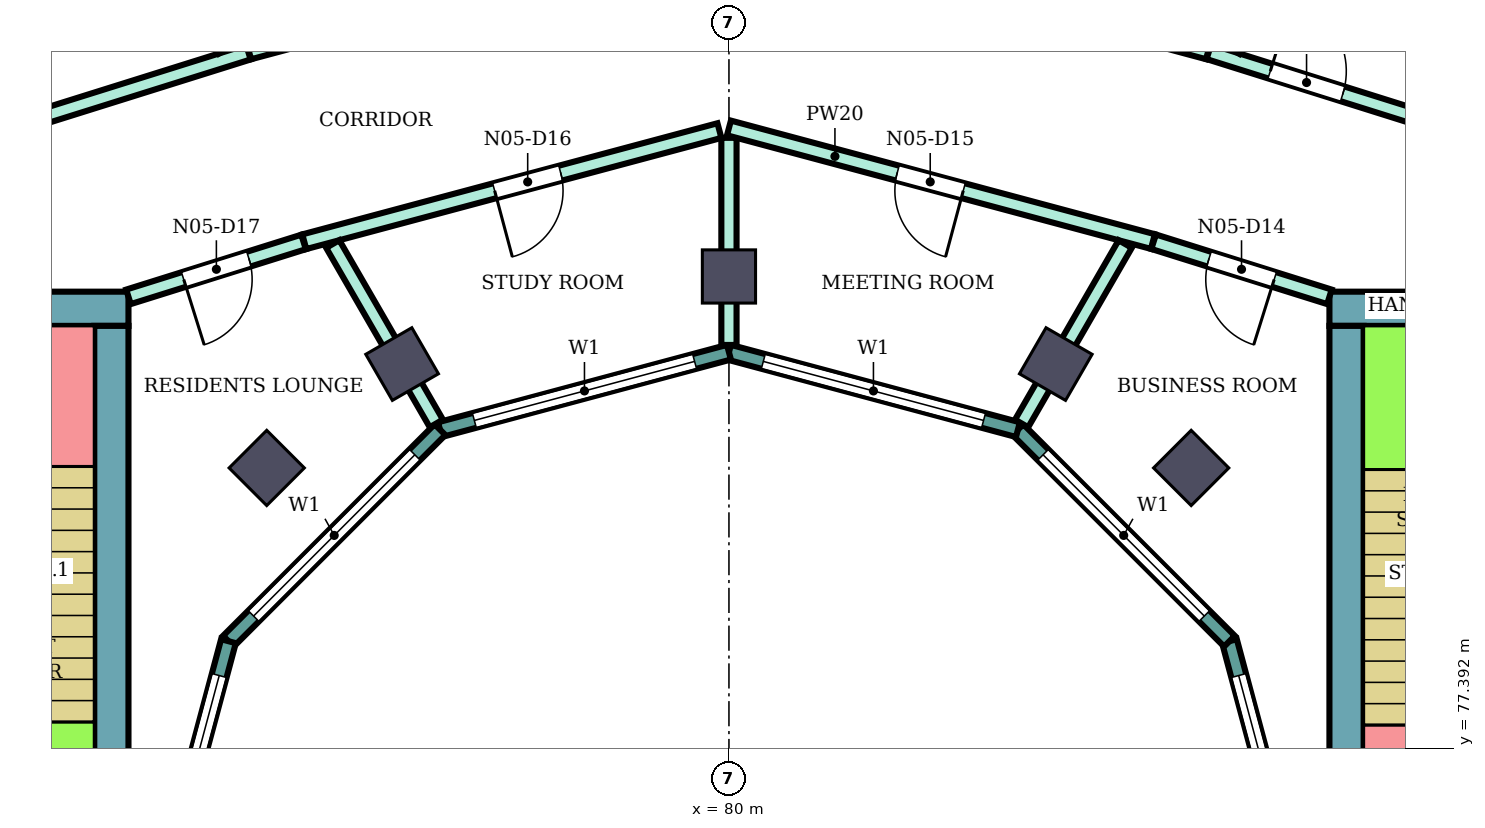
"""IFC4 building model, lengths in metres.
Left out: names, types, materials, properties, quantities, classifications, styles, units other than length and angle.
Written with IfcOpenShell. Run it as: python <this file> out.ifc"""

import sys

from ifc_helpers import new_model, si_unit, direction, frame, frame_2d, origin, origin_2d, place, context, subcontext, project, spatial, rectangle, extrude, element, fill, save


model = new_model("IFC4")
c1 = context("Model", 3, precision=1e-05, world=origin(), true_north=direction((0.0, 1.0)))
c2 = subcontext(c1, "Body", "Model", "MODEL_VIEW")
j1 = project(units=[si_unit("LENGTHUNIT", "METRE"), si_unit("PLANEANGLEUNIT", "RADIAN")], contexts=[c1])
p1 = place(None, origin())
s1 = spatial("IfcSite", under=j1, at=p1, CompositionType="ELEMENT")
p2 = place(p1, origin())
s2 = spatial("IfcBuilding", under=s1, at=p2, CompositionType="ELEMENT")
p3 = place(p2, frame((0.0, 0.0, 314.9)))
s3 = spatial("IfcBuildingStorey", under=s2, at=p3, CompositionType="ELEMENT", Elevation=314.9)
for number, where, z_axis, x_axis in (
    (1, (86.081, 81.081, 0.0), (0.0, 0.0, 1.0), (0.707, 0.707, 0.0)),
    (2, (84.3, 82.448, 0.0), (0.0, 0.0, 1.0), (0.5, 0.866, 0.0)),
    (3, (80.0, 83.6, 0.0), (0.0, 0.0, 1.0), (0.0, 1.0, 0.0)),
    (4, (75.7, 82.448, 0.0), (0.0, 0.0, 1.0), (-0.5, 0.866, 0.0)),
    (5, (73.919, 81.081, 0.0), (0.0, 0.0, 1.0), (-0.707, 0.707, 0.0)),
):
    element("IfcColumn", number, at=place(p3, frame(where, z_axis=z_axis, x_axis=x_axis)), inside=s3, PredefinedType="COLUMN", context=c2, shape_type="SweptSolid", body=[
        extrude(rectangle(XDim=0.7, YDim=0.7, at=origin_2d()), origin(), (0.0, 0.0, 1.0), 4.4),
    ])
p4 = place(p3, frame((87.9, 83.175, 0.0), z_axis=(0.0, 0.0, 1.0), x_axis=(1.0, 0.0, 0.0)))
e6 = element("IfcWall", 6, at=p4, inside=s3, PredefinedType="SHEAR", context=c2, shape_type="SweptSolid", body=[
    extrude(rectangle(XDim=10.0, YDim=0.45, at=frame_2d((5.0, 0.0))), origin(), (0.0, 0.0, 1.0), 4.08),
])
p5 = place(p4, frame((4.2, 0.0, 0.0)))
e7 = element("IfcOpeningElement", 7, at=p5, cuts=e6, PredefinedType="OPENING", context=c2, shape_type="SweptSolid", body=[
    extrude(rectangle(XDim=2.4, YDim=2.4, at=frame_2d((1.2, 1.2))), frame((0.0, 0.235, 0.0), z_axis=(0.0, -1.0, 0.0), x_axis=(1.0, 0.0, 0.0)), (0.0, 0.0, 1.0), 0.47),
])
p6 = place(p3, frame((88.125, 75.0, 0.0), z_axis=(0.0, 0.0, 1.0), x_axis=(0.0, 1.0, 0.0)))
e8 = element("IfcWall", 8, at=p6, inside=s3, PredefinedType="SHEAR", context=c2, shape_type="SweptSolid", body=[
    extrude(rectangle(XDim=7.95, YDim=0.45, at=frame_2d((3.975, 0.0))), origin(), (0.0, 0.0, 1.0), 4.08),
])
p7 = place(p3, frame((72.1, 83.175, 0.0), z_axis=(0.0, 0.0, 1.0), x_axis=(-1.0, 0.0, 0.0)))
e9 = element("IfcWall", 9, at=p7, inside=s3, PredefinedType="SHEAR", context=c2, shape_type="SweptSolid", body=[
    extrude(rectangle(XDim=10.0, YDim=0.45, at=frame_2d((5.0, 0.0))), origin(), (0.0, 0.0, 1.0), 4.08),
])
p8 = place(p7, frame((4.2, 0.0, 0.0)))
e10 = element("IfcOpeningElement", 10, at=p8, cuts=e9, PredefinedType="OPENING", context=c2, shape_type="SweptSolid", body=[
    extrude(rectangle(XDim=2.4, YDim=2.4, at=frame_2d((1.2, 1.2))), frame((0.0, 0.235, 0.0), z_axis=(0.0, -1.0, 0.0), x_axis=(1.0, 0.0, 0.0)), (0.0, 0.0, 1.0), 0.47),
])
p9 = place(p3, frame((71.875, 82.95, 0.0), z_axis=(0.0, 0.0, 1.0), x_axis=(0.0, -1.0, 0.0)))
e11 = element("IfcWall", 11, at=p9, inside=s3, PredefinedType="SHEAR", context=c2, shape_type="SweptSolid", body=[
    extrude(rectangle(XDim=7.95, YDim=0.45, at=frame_2d((3.975, 0.0))), origin(), (0.0, 0.0, 1.0), 4.08),
])
p10 = place(p3, frame((87.604, 75.0, 0.0), z_axis=(0.0, 0.0, 1.0), x_axis=(-0.258789828301, 0.965933654434, 0.0)))
e12 = element("IfcWall", 12, at=p10, inside=s3, PredefinedType="NOTDEFINED", context=c2, shape_type="SweptSolid", body=[
    extrude(rectangle(XDim=3.936, YDim=0.2, at=frame_2d((1.968, 0.0))), origin(), (0.0, 0.0, 1.0), 4.4),
])
p11 = place(p10, frame((0.468, 0.0, 0.9)))
e13 = element("IfcOpeningElement", 13, at=p11, cuts=e12, PredefinedType="OPENING", context=c2, shape_type="SweptSolid", body=[
    extrude(rectangle(XDim=3.0, YDim=2.3, at=frame_2d((1.5, 1.15))), frame((0.0, 0.11, 0.0), z_axis=(0.0, -1.0, 0.0), x_axis=(1.0, 0.0, 0.0)), (0.0, 0.0, 1.0), 0.22),
])
p12 = place(p3, frame((86.585, 78.802, 0.0), z_axis=(0.0, 0.0, 1.0), x_axis=(-0.707106781187, 0.707106781187, 0.0)))
e14 = element("IfcWall", 14, at=p12, inside=s3, PredefinedType="NOTDEFINED", context=c2, shape_type="SweptSolid", body=[
    extrude(rectangle(XDim=3.936, YDim=0.2, at=frame_2d((1.968, 0.0))), origin(), (0.0, 0.0, 1.0), 4.4),
])
p13 = place(p12, frame((0.468, 0.0, 0.9)))
e15 = element("IfcOpeningElement", 15, at=p13, cuts=e14, PredefinedType="OPENING", context=c2, shape_type="SweptSolid", body=[
    extrude(rectangle(XDim=3.0, YDim=2.3, at=frame_2d((1.5, 1.15))), frame((0.0, 0.11, 0.0), z_axis=(0.0, -1.0, 0.0), x_axis=(1.0, 0.0, 0.0)), (0.0, 0.0, 1.0), 0.22),
])
p14 = place(p3, frame((83.802, 81.585, 0.0), z_axis=(0.0, 0.0, 1.0), x_axis=(-0.965933654434, 0.258789828301, 0.0)))
e16 = element("IfcWall", 16, at=p14, inside=s3, PredefinedType="NOTDEFINED", context=c2, shape_type="SweptSolid", body=[
    extrude(rectangle(XDim=3.936, YDim=0.2, at=frame_2d((1.968, 0.0))), origin(), (0.0, 0.0, 1.0), 4.4),
])
p15 = place(p14, frame((0.468, 0.0, 0.9)))
e17 = element("IfcOpeningElement", 17, at=p15, cuts=e16, PredefinedType="OPENING", context=c2, shape_type="SweptSolid", body=[
    extrude(rectangle(XDim=3.0, YDim=2.3, at=frame_2d((1.5, 1.15))), frame((0.0, 0.11, 0.0), z_axis=(0.0, -1.0, 0.0), x_axis=(1.0, 0.0, 0.0)), (0.0, 0.0, 1.0), 0.22),
])
p16 = place(p3, frame((80.0, 82.604, 0.0), z_axis=(0.0, 0.0, 1.0), x_axis=(-0.965933654434, -0.258789828301, 0.0)))
e18 = element("IfcWall", 18, at=p16, inside=s3, PredefinedType="NOTDEFINED", context=c2, shape_type="SweptSolid", body=[
    extrude(rectangle(XDim=3.936, YDim=0.2, at=frame_2d((1.968, 0.0))), origin(), (0.0, 0.0, 1.0), 4.4),
])
p17 = place(p16, frame((0.468, 0.0, 0.9)))
e19 = element("IfcOpeningElement", 19, at=p17, cuts=e18, PredefinedType="OPENING", context=c2, shape_type="SweptSolid", body=[
    extrude(rectangle(XDim=3.0, YDim=2.3, at=frame_2d((1.5, 1.15))), frame((0.0, 0.11, 0.0), z_axis=(0.0, -1.0, 0.0), x_axis=(1.0, 0.0, 0.0)), (0.0, 0.0, 1.0), 0.22),
])
p18 = place(p3, frame((76.198, 81.585, 0.0), z_axis=(0.0, 0.0, 1.0), x_axis=(-0.707106781187, -0.707106781187, 0.0)))
e20 = element("IfcWall", 20, at=p18, inside=s3, PredefinedType="NOTDEFINED", context=c2, shape_type="SweptSolid", body=[
    extrude(rectangle(XDim=3.936, YDim=0.2, at=frame_2d((1.968, 0.0))), origin(), (0.0, 0.0, 1.0), 4.4),
])
p19 = place(p18, frame((0.468, 0.0, 0.9)))
e21 = element("IfcOpeningElement", 21, at=p19, cuts=e20, PredefinedType="OPENING", context=c2, shape_type="SweptSolid", body=[
    extrude(rectangle(XDim=3.0, YDim=2.3, at=frame_2d((1.5, 1.15))), frame((0.0, 0.11, 0.0), z_axis=(0.0, -1.0, 0.0), x_axis=(1.0, 0.0, 0.0)), (0.0, 0.0, 1.0), 0.22),
])
p20 = place(p3, frame((73.415, 78.802, 0.0), z_axis=(0.0, 0.0, 1.0), x_axis=(-0.258789828301, -0.965933654434, 0.0)))
e22 = element("IfcWall", 22, at=p20, inside=s3, PredefinedType="NOTDEFINED", context=c2, shape_type="SweptSolid", body=[
    extrude(rectangle(XDim=3.936, YDim=0.2, at=frame_2d((1.968, 0.0))), origin(), (0.0, 0.0, 1.0), 4.4),
])
p21 = place(p20, frame((0.468, 0.0, 0.9)))
e23 = element("IfcOpeningElement", 23, at=p21, cuts=e22, PredefinedType="OPENING", context=c2, shape_type="SweptSolid", body=[
    extrude(rectangle(XDim=3.0, YDim=2.3, at=frame_2d((1.5, 1.15))), frame((0.0, 0.11, 0.0), z_axis=(0.0, -1.0, 0.0), x_axis=(1.0, 0.0, 0.0)), (0.0, 0.0, 1.0), 0.22),
])
p22 = place(p3, frame((68.201, 84.834, 0.0), z_axis=(0.0, 0.0, 1.0), x_axis=(0.954232917497, 0.29906443982, 0.0)))
e24 = element("IfcWall", 24, at=p22, inside=s3, PredefinedType="PARTITIONING", context=c2, shape_type="SweptSolid", body=[
    extrude(rectangle(XDim=5.74, YDim=0.2, at=frame_2d((2.87, 0.0))), origin(), (0.0, 0.0, 1.0), 3.95),
])
p23 = place(p3, frame((72.1, 83.332, 0.0), z_axis=(0.0, 0.0, 1.0), x_axis=(0.954233106619, 0.299063836383, 0.0)))
e25 = element("IfcWall", 25, at=p23, inside=s3, PredefinedType="PARTITIONING", context=c2, shape_type="SweptSolid", body=[
    extrude(rectangle(XDim=2.414, YDim=0.2, at=frame_2d((1.207, 0.0))), origin(), (0.0, 0.0, 1.0), 3.95),
])
p24 = place(p23, frame((0.762, 0.0, 0.0)))
e26 = element("IfcOpeningElement", 26, at=p24, cuts=e25, PredefinedType="OPENING", context=c2, shape_type="SweptSolid", body=[
    extrude(rectangle(XDim=0.9, YDim=2.1, at=frame_2d((0.45, 1.05))), frame((0.0, 0.11, 0.0), z_axis=(0.0, -1.0, 0.0), x_axis=(1.0, 0.0, 0.0)), (0.0, 0.0, 1.0), 0.22),
])
p25 = place(p3, frame((73.687, 86.554, 0.0), z_axis=(0.0, 0.0, 1.0), x_axis=(0.96595903825, 0.258695064551, 0.0)))
e27 = element("IfcWall", 27, at=p25, inside=s3, PredefinedType="PARTITIONING", context=c2, shape_type="SweptSolid", body=[
    extrude(rectangle(XDim=6.446, YDim=0.2, at=frame_2d((3.223, 0.0))), origin(), (0.0, 0.0, 1.0), 3.95),
])
p26 = place(p25, frame((3.638, 0.0, 0.0)))
e28 = element("IfcOpeningElement", 28, at=p26, cuts=e27, PredefinedType="OPENING", context=c2, shape_type="SweptSolid", body=[
    extrude(rectangle(XDim=1.0, YDim=2.1, at=frame_2d((0.5, 1.05))), frame((0.0, 0.11, 0.0), z_axis=(0.0, -1.0, 0.0), x_axis=(1.0, 0.0, 0.0)), (0.0, 0.0, 1.0), 0.22),
])
p27 = place(p3, frame((74.413, 84.057, 0.0), z_axis=(0.0, 0.0, 1.0), x_axis=(0.965972135939, 0.258646153246, 0.0)))
e29 = element("IfcWall", 29, at=p27, inside=s3, PredefinedType="PARTITIONING", context=c2, shape_type="SweptSolid", body=[
    extrude(rectangle(XDim=5.654, YDim=0.2, at=frame_2d((2.827, 0.0))), origin(), (0.0, 0.0, 1.0), 3.95),
])
p28 = place(p27, frame((2.593, 0.0, 0.0)))
e30 = element("IfcOpeningElement", 30, at=p28, cuts=e29, PredefinedType="OPENING", context=c2, shape_type="SweptSolid", body=[
    extrude(rectangle(XDim=0.9, YDim=2.1, at=frame_2d((0.45, 1.05))), frame((0.0, 0.11, 0.0), z_axis=(0.0, -1.0, 0.0), x_axis=(1.0, 0.0, 0.0)), (0.0, 0.0, 1.0), 0.22),
])
p29 = place(p3, frame((74.787, 84.027, 0.0), z_axis=(0.0, 0.0, 1.0), x_axis=(0.500079107518, -0.86597972622, 0.0)))
e31 = element("IfcWall", 31, at=p29, inside=s3, PredefinedType="PARTITIONING", context=c2, shape_type="SweptSolid", body=[
    extrude(rectangle(XDim=2.726, YDim=0.2, at=frame_2d((1.363, 0.0))), origin(), (0.0, 0.0, 1.0), 3.95),
])
p30 = place(p3, frame((80.0, 82.699, 0.0), z_axis=(0.0, 0.0, 1.0), x_axis=(0.0, 1.0, 0.0)))
e32 = element("IfcWall", 32, at=p30, inside=s3, PredefinedType="PARTITIONING", context=c2, shape_type="SweptSolid", body=[
    extrude(rectangle(XDim=2.725, YDim=0.2, at=frame_2d((1.363, 0.0))), origin(), (0.0, 0.0, 1.0), 3.95),
])
p31 = place(p3, frame((80.0, 85.554, 0.0), z_axis=(0.0, 0.0, 1.0), x_axis=(0.965928989968, -0.258807237802, 0.0)))
e33 = element("IfcWall", 33, at=p31, inside=s3, PredefinedType="PARTITIONING", context=c2, shape_type="SweptSolid", body=[
    extrude(rectangle(XDim=5.774, YDim=0.2, at=frame_2d((2.887, 0.0))), origin(), (0.0, 0.0, 1.0), 3.95),
])
p32 = place(p31, frame((2.292, 0.0, 0.0)))
e34 = element("IfcOpeningElement", 34, at=p32, cuts=e33, PredefinedType="OPENING", context=c2, shape_type="SweptSolid", body=[
    extrude(rectangle(XDim=0.9, YDim=2.1, at=frame_2d((0.45, 1.05))), frame((0.0, 0.11, 0.0), z_axis=(0.0, -1.0, 0.0), x_axis=(1.0, 0.0, 0.0)), (0.0, 0.0, 1.0), 0.22),
])
p33 = place(p3, frame((80.0, 88.247, 0.0), z_axis=(0.0, 0.0, 1.0), x_axis=(0.965807659316, -0.259259648244, 0.0)))
e35 = element("IfcWall", 35, at=p33, inside=s3, PredefinedType="PARTITIONING", context=c2, shape_type="SweptSolid", body=[
    extrude(rectangle(XDim=6.526, YDim=0.2, at=frame_2d((3.263, 0.0))), origin(), (0.0, 0.0, 1.0), 3.95),
])
p34 = place(p33, frame((1.93, 0.0, 0.0)))
e36 = element("IfcOpeningElement", 36, at=p34, cuts=e35, PredefinedType="OPENING", context=c2, shape_type="SweptSolid", body=[
    extrude(rectangle(XDim=1.0, YDim=2.1, at=frame_2d((0.5, 1.05))), frame((0.0, 0.11, 0.0), z_axis=(0.0, -1.0, 0.0), x_axis=(1.0, 0.0, 0.0)), (0.0, 0.0, 1.0), 0.22),
])
p35 = place(p3, frame((83.85, 81.667, 0.0), z_axis=(0.0, 0.0, 1.0), x_axis=(0.500185068774, 0.865918527909, 0.0)))
e37 = element("IfcWall", 37, at=p35, inside=s3, PredefinedType="PARTITIONING", context=c2, shape_type="SweptSolid", body=[
    extrude(rectangle(XDim=2.726, YDim=0.2, at=frame_2d((1.363, 0.0))), origin(), (0.0, 0.0, 1.0), 3.95),
])
p36 = place(p3, frame((85.587, 84.057, 0.0), z_axis=(0.0, 0.0, 1.0), x_axis=(0.954239513179, -0.299043393987, 0.0)))
e38 = element("IfcWall", 38, at=p36, inside=s3, PredefinedType="PARTITIONING", context=c2, shape_type="SweptSolid", body=[
    extrude(rectangle(XDim=2.424, YDim=0.2, at=frame_2d((1.212, 0.0))), origin(), (0.0, 0.0, 1.0), 3.95),
])
p37 = place(p36, frame((0.762, 0.0, 0.0)))
e39 = element("IfcOpeningElement", 39, at=p37, cuts=e38, PredefinedType="OPENING", context=c2, shape_type="SweptSolid", body=[
    extrude(rectangle(XDim=0.9, YDim=2.1, at=frame_2d((0.45, 1.05))), frame((0.0, 0.11, 0.0), z_axis=(0.0, -1.0, 0.0), x_axis=(1.0, 0.0, 0.0)), (0.0, 0.0, 1.0), 0.22),
])
p38 = place(p3, frame((86.313, 86.555, 0.0), z_axis=(0.0, 0.0, 1.0), x_axis=(0.9540216201, -0.299737799389, 0.0)))
e40 = element("IfcWall", 40, at=p38, inside=s3, PredefinedType="PARTITIONING", context=c2, shape_type="SweptSolid", body=[
    extrude(rectangle(XDim=5.719, YDim=0.2, at=frame_2d((2.86, 0.0))), origin(), (0.0, 0.0, 1.0), 3.95),
])
p39 = place(p38, frame((0.848, 0.0, 0.0)))
e41 = element("IfcOpeningElement", 41, at=p39, cuts=e40, PredefinedType="OPENING", context=c2, shape_type="SweptSolid", body=[
    extrude(rectangle(XDim=1.0, YDim=2.1, at=frame_2d((0.5, 1.05))), frame((0.0, 0.11, 0.0), z_axis=(0.0, -1.0, 0.0), x_axis=(1.0, 0.0, 0.0)), (0.0, 0.0, 1.0), 0.22),
])
p40 = place(p3, frame((69.855, 92.579, 0.0), z_axis=(0.0, 0.0, 1.0), x_axis=(0.499801463163, -0.866139998742, 0.0)))
e42 = element("IfcWall", 42, at=p40, inside=s3, PredefinedType="PARTITIONING", context=c2, shape_type="SweptSolid", body=[
    extrude(rectangle(XDim=6.955, YDim=0.1, at=frame_2d((3.478, 0.0))), origin(), (0.0, 0.0, 1.0), 3.95),
])
p41 = place(p40, frame((1.029, 0.0, 0.0)))
e43 = element("IfcOpeningElement", 43, at=p41, cuts=e42, PredefinedType="OPENING", context=c2, shape_type="SweptSolid", body=[
    extrude(rectangle(XDim=0.9, YDim=2.1, at=frame_2d((0.45, 1.05))), frame((0.0, 0.06, 0.0), z_axis=(0.0, -1.0, 0.0), x_axis=(1.0, 0.0, 0.0)), (0.0, 0.0, 1.0), 0.12),
])
p42 = place(p3, frame((86.673, 86.553, 0.0), z_axis=(0.0, 0.0, 1.0), x_axis=(0.500103298341, 0.865965756245, 0.0)))
e44 = element("IfcWall", 44, at=p42, inside=s3, PredefinedType="PARTITIONING", context=c2, shape_type="SweptSolid", body=[
    extrude(rectangle(XDim=6.955, YDim=0.1, at=frame_2d((3.477, 0.0))), origin(), (0.0, 0.0, 1.0), 3.95),
])
p43 = place(p42, frame((5.015, 0.0, 0.0)))
e45 = element("IfcOpeningElement", 45, at=p43, cuts=e44, PredefinedType="OPENING", context=c2, shape_type="SweptSolid", body=[
    extrude(rectangle(XDim=0.9, YDim=2.1, at=frame_2d((0.45, 1.05))), frame((0.0, 0.06, 0.0), z_axis=(0.0, -1.0, 0.0), x_axis=(1.0, 0.0, 0.0)), (0.0, 0.0, 1.0), 0.12),
])
p44 = place(p42, frame((1.028, 0.0, 0.0)))
e46 = element("IfcOpeningElement", 46, at=p44, cuts=e44, PredefinedType="OPENING", context=c2, shape_type="SweptSolid", body=[
    extrude(rectangle(XDim=0.8, YDim=2.1, at=frame_2d((0.4, 1.05))), frame((0.0, 0.06, 0.0), z_axis=(0.0, -1.0, 0.0), x_axis=(1.0, 0.0, 0.0)), (0.0, 0.0, 1.0), 0.12),
])
p45 = place(p11, origin())
e47 = element("IfcWindow", 47, at=p45, inside=s3, PartitioningType="SINGLE_PANEL", PredefinedType="WINDOW", context=c2, shape_type="SweptSolid", body=[
    extrude(rectangle(XDim=3.0, YDim=2.3, at=frame_2d((1.5, 1.15))), frame((0.0, 0.03, 0.0), z_axis=(0.0, -1.0, 0.0), x_axis=(1.0, 0.0, 0.0)), (0.0, 0.0, 1.0), 0.06),
])
fill(e13, e47)
p46 = place(p13, origin())
e48 = element("IfcWindow", 48, at=p46, inside=s3, PartitioningType="SINGLE_PANEL", PredefinedType="WINDOW", context=c2, shape_type="SweptSolid", body=[
    extrude(rectangle(XDim=3.0, YDim=2.3, at=frame_2d((1.5, 1.15))), frame((0.0, 0.03, 0.0), z_axis=(0.0, -1.0, 0.0), x_axis=(1.0, 0.0, 0.0)), (0.0, 0.0, 1.0), 0.06),
])
fill(e15, e48)
p47 = place(p15, origin())
e49 = element("IfcWindow", 49, at=p47, inside=s3, PartitioningType="SINGLE_PANEL", PredefinedType="WINDOW", context=c2, shape_type="SweptSolid", body=[
    extrude(rectangle(XDim=3.0, YDim=2.3, at=frame_2d((1.5, 1.15))), frame((0.0, 0.03, 0.0), z_axis=(0.0, -1.0, 0.0), x_axis=(1.0, 0.0, 0.0)), (0.0, 0.0, 1.0), 0.06),
])
fill(e17, e49)
p48 = place(p17, origin())
e50 = element("IfcWindow", 50, at=p48, inside=s3, PartitioningType="SINGLE_PANEL", PredefinedType="WINDOW", context=c2, shape_type="SweptSolid", body=[
    extrude(rectangle(XDim=3.0, YDim=2.3, at=frame_2d((1.5, 1.15))), frame((0.0, 0.03, 0.0), z_axis=(0.0, -1.0, 0.0), x_axis=(1.0, 0.0, 0.0)), (0.0, 0.0, 1.0), 0.06),
])
fill(e19, e50)
p49 = place(p19, origin())
e51 = element("IfcWindow", 51, at=p49, inside=s3, PartitioningType="SINGLE_PANEL", PredefinedType="WINDOW", context=c2, shape_type="SweptSolid", body=[
    extrude(rectangle(XDim=3.0, YDim=2.3, at=frame_2d((1.5, 1.15))), frame((0.0, 0.03, 0.0), z_axis=(0.0, -1.0, 0.0), x_axis=(1.0, 0.0, 0.0)), (0.0, 0.0, 1.0), 0.06),
])
fill(e21, e51)
p50 = place(p21, origin())
e52 = element("IfcWindow", 52, at=p50, inside=s3, PartitioningType="SINGLE_PANEL", PredefinedType="WINDOW", context=c2, shape_type="SweptSolid", body=[
    extrude(rectangle(XDim=3.0, YDim=2.3, at=frame_2d((1.5, 1.15))), frame((0.0, 0.03, 0.0), z_axis=(0.0, -1.0, 0.0), x_axis=(1.0, 0.0, 0.0)), (0.0, 0.0, 1.0), 0.06),
])
fill(e23, e52)
p51 = place(p39, origin())
e53 = element("IfcDoor", 53, at=p51, inside=s3, OperationType="SINGLE_SWING_LEFT", PredefinedType="DOOR", context=c2, shape_type="SweptSolid", body=[
    extrude(rectangle(XDim=1.0, YDim=2.1, at=frame_2d((0.5, 1.05))), frame((0.0, 0.025, 0.0), z_axis=(0.0, -1.0, 0.0), x_axis=(1.0, 0.0, 0.0)), (0.0, 0.0, 1.0), 0.05),
])
fill(e41, e53)
p52 = place(p37, frame((0.9, 0.0, 0.0), z_axis=(0.0, 0.0, 1.0), x_axis=(-1.0, 0.0, 0.0)))
e54 = element("IfcDoor", 54, at=p52, inside=s3, OperationType="SINGLE_SWING_LEFT", PredefinedType="DOOR", context=c2, shape_type="SweptSolid", body=[
    extrude(rectangle(XDim=0.9, YDim=2.1, at=frame_2d((0.45, 1.05))), frame((0.0, 0.025, 0.0), z_axis=(0.0, -1.0, 0.0), x_axis=(1.0, 0.0, 0.0)), (0.0, 0.0, 1.0), 0.05),
])
fill(e39, e54)
p53 = place(p32, frame((0.9, 0.0, 0.0), z_axis=(0.0, 0.0, 1.0), x_axis=(-1.0, 0.0, 0.0)))
e55 = element("IfcDoor", 55, at=p53, inside=s3, OperationType="SINGLE_SWING_LEFT", PredefinedType="DOOR", context=c2, shape_type="SweptSolid", body=[
    extrude(rectangle(XDim=0.9, YDim=2.1, at=frame_2d((0.45, 1.05))), frame((0.0, 0.025, 0.0), z_axis=(0.0, -1.0, 0.0), x_axis=(1.0, 0.0, 0.0)), (0.0, 0.0, 1.0), 0.05),
])
fill(e34, e55)
p54 = place(p28, frame((0.9, 0.0, 0.0), z_axis=(0.0, 0.0, 1.0), x_axis=(-1.0, 0.0, 0.0)))
e56 = element("IfcDoor", 56, at=p54, inside=s3, OperationType="SINGLE_SWING_RIGHT", PredefinedType="DOOR", context=c2, shape_type="SweptSolid", body=[
    extrude(rectangle(XDim=0.9, YDim=2.1, at=frame_2d((0.45, 1.05))), frame((0.0, 0.025, 0.0), z_axis=(0.0, -1.0, 0.0), x_axis=(1.0, 0.0, 0.0)), (0.0, 0.0, 1.0), 0.05),
])
fill(e30, e56)
p55 = place(p24, frame((0.9, 0.0, 0.0), z_axis=(0.0, 0.0, 1.0), x_axis=(-1.0, 0.0, 0.0)))
e57 = element("IfcDoor", 57, at=p55, inside=s3, OperationType="SINGLE_SWING_RIGHT", PredefinedType="DOOR", context=c2, shape_type="SweptSolid", body=[
    extrude(rectangle(XDim=0.9, YDim=2.1, at=frame_2d((0.45, 1.05))), frame((0.0, 0.025, 0.0), z_axis=(0.0, -1.0, 0.0), x_axis=(1.0, 0.0, 0.0)), (0.0, 0.0, 1.0), 0.05),
])
fill(e26, e57)
save(model, sys.argv[1])
